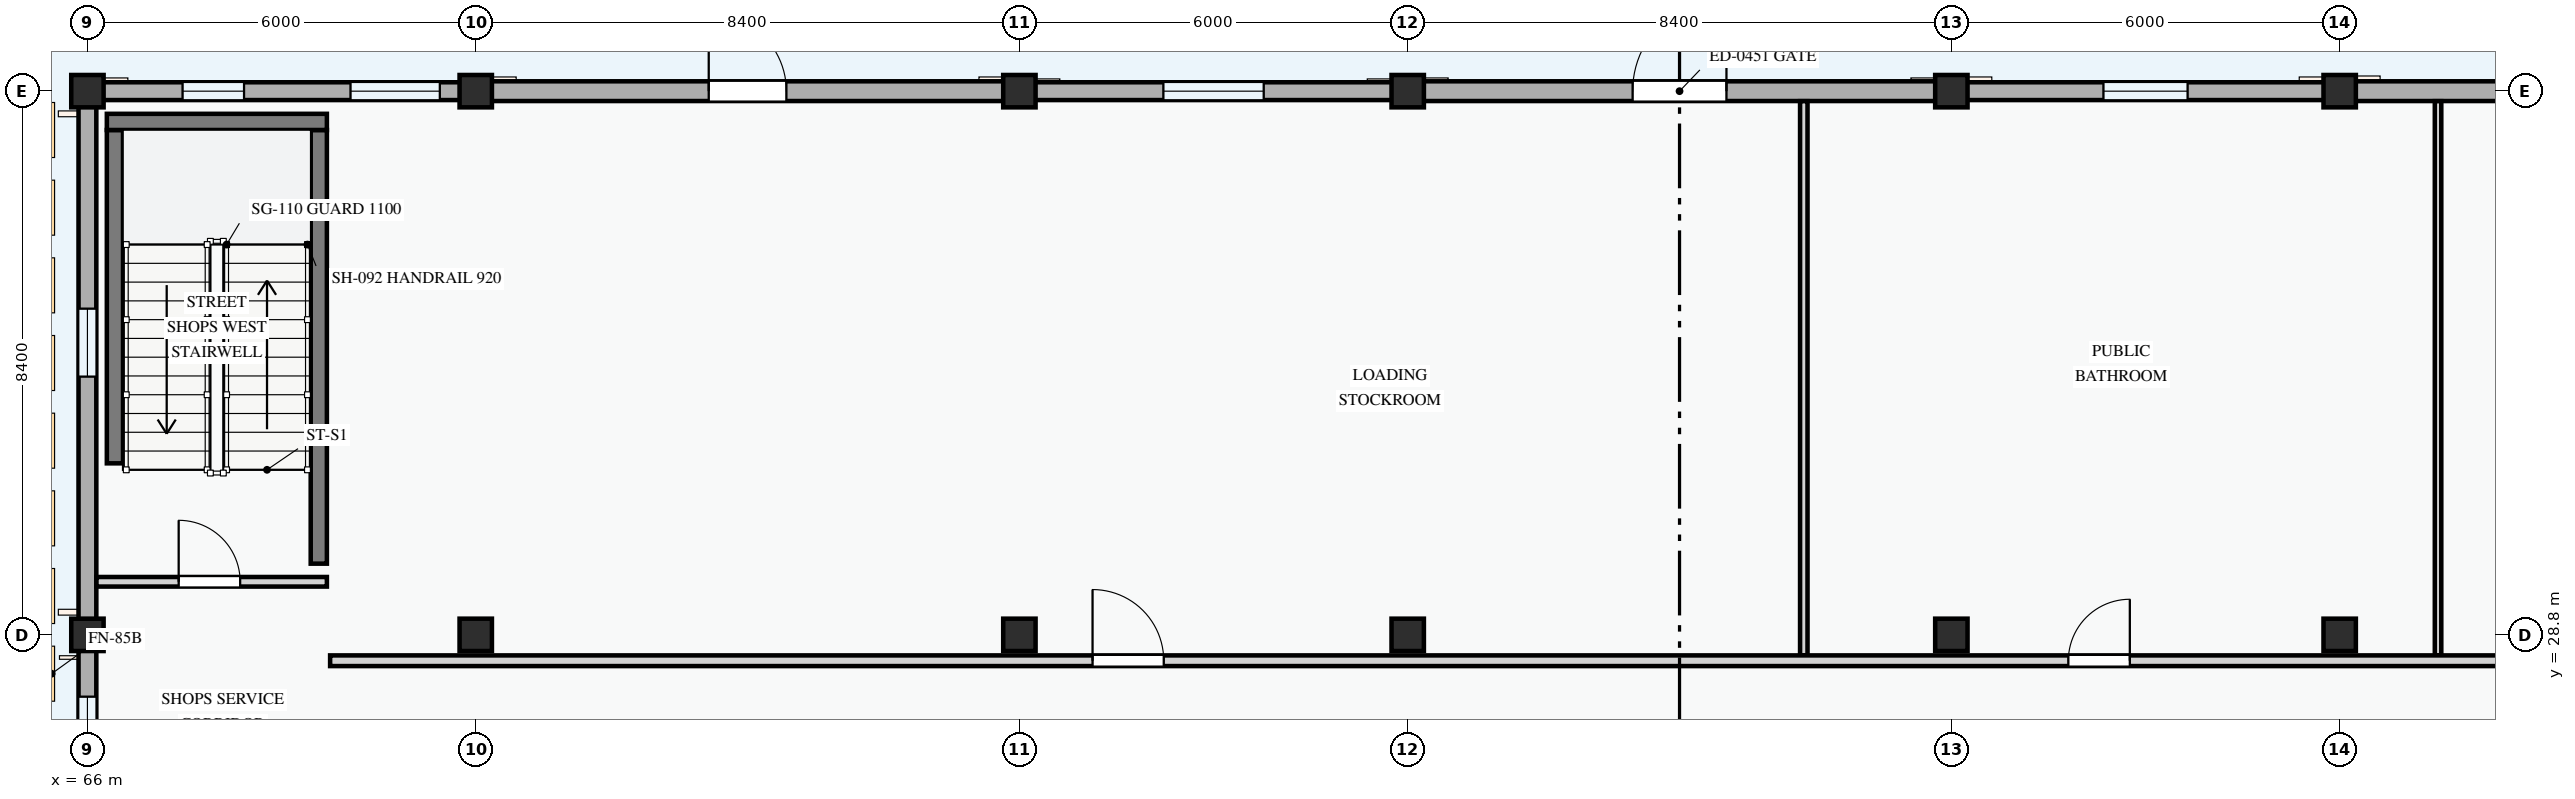
"""IFC4 building model, lengths in metres.
Left out: names, types, materials, properties, quantities, classifications, styles, units other than length and angle.
Written with IfcOpenShell. Run it as: python <this file> out.ifc"""

import sys

from ifc_helpers import new_model, si_unit, direction, frame, frame_2d, origin, origin_2d, place, context, subcontext, project, spatial, rectangle, circle, extrude, element, fill, save


model = new_model("IFC4")
c1 = context("Model", 3, precision=1e-05, world=origin(), true_north=direction((0.0, 1.0)))
c2 = subcontext(c1, "Body", "Model", "MODEL_VIEW")
j1 = project(units=[si_unit("LENGTHUNIT", "METRE"), si_unit("PLANEANGLEUNIT", "RADIAN")], contexts=[c1])
p1 = place(None, origin())
s1 = spatial("IfcSite", under=j1, at=p1, CompositionType="ELEMENT")
p2 = place(p1, origin())
s2 = spatial("IfcBuilding", under=s1, at=p2, CompositionType="ELEMENT")
p3 = place(p2, origin())
s3 = spatial("IfcBuildingStorey", under=s2, at=p3, CompositionType="ELEMENT", Elevation=0.0)
for number, where, z_axis, x_axis in (
    (1, (66.0, 28.8, 0.0), (0.0, 0.0, 1.0), (1.0, 0.0, 0.0)),
    (2, (66.0, 37.2, 0.0), (0.0, 0.0, 1.0), (1.0, 0.0, 0.0)),
):
    element("IfcColumn", number, at=place(p3, frame(where, z_axis=z_axis, x_axis=x_axis)), inside=s3, PredefinedType="COLUMN", context=c2, shape_type="SweptSolid", body=[
        extrude(rectangle(XDim=0.5, YDim=0.5, at=origin_2d()), origin(), (0.0, 0.0, 1.0), 4.5),
    ])
p4 = place(p3, frame((72.0, 28.8, 0.0), z_axis=(0.0, 0.0, 1.0), x_axis=(1.0, 0.0, 0.0)))
e3 = element("IfcColumn", 3, at=p4, inside=s3, PredefinedType="COLUMN", context=c2, shape_type="SweptSolid", body=[
    extrude(circle(Radius=0.25, at=origin_2d()), origin(), (0.0, 0.0, 1.0), 4.5),
])
p5 = place(p3, frame((72.0, 37.2, 0.0), z_axis=(0.0, 0.0, 1.0), x_axis=(1.0, 0.0, 0.0)))
e4 = element("IfcColumn", 4, at=p5, inside=s3, PredefinedType="COLUMN", context=c2, shape_type="SweptSolid", body=[
    extrude(rectangle(XDim=0.5, YDim=0.5, at=origin_2d()), origin(), (0.0, 0.0, 1.0), 4.5),
])
p6 = place(p3, frame((80.4, 28.8, 0.0), z_axis=(0.0, 0.0, 1.0), x_axis=(1.0, 0.0, 0.0)))
e5 = element("IfcColumn", 5, at=p6, inside=s3, PredefinedType="COLUMN", context=c2, shape_type="SweptSolid", body=[
    extrude(circle(Radius=0.25, at=origin_2d()), origin(), (0.0, 0.0, 1.0), 4.5),
])
p7 = place(p3, frame((80.4, 37.2, 0.0), z_axis=(0.0, 0.0, 1.0), x_axis=(1.0, 0.0, 0.0)))
e6 = element("IfcColumn", 6, at=p7, inside=s3, PredefinedType="COLUMN", context=c2, shape_type="SweptSolid", body=[
    extrude(rectangle(XDim=0.5, YDim=0.5, at=origin_2d()), origin(), (0.0, 0.0, 1.0), 4.5),
])
p8 = place(p3, frame((86.4, 28.8, 0.0), z_axis=(0.0, 0.0, 1.0), x_axis=(1.0, 0.0, 0.0)))
e7 = element("IfcColumn", 7, at=p8, inside=s3, PredefinedType="COLUMN", context=c2, shape_type="SweptSolid", body=[
    extrude(circle(Radius=0.25, at=origin_2d()), origin(), (0.0, 0.0, 1.0), 4.5),
])
p9 = place(p3, frame((86.4, 37.2, 0.0), z_axis=(0.0, 0.0, 1.0), x_axis=(1.0, 0.0, 0.0)))
e8 = element("IfcColumn", 8, at=p9, inside=s3, PredefinedType="COLUMN", context=c2, shape_type="SweptSolid", body=[
    extrude(rectangle(XDim=0.5, YDim=0.5, at=origin_2d()), origin(), (0.0, 0.0, 1.0), 4.5),
])
p10 = place(p3, frame((94.8, 28.8, 0.0), z_axis=(0.0, 0.0, 1.0), x_axis=(1.0, 0.0, 0.0)))
e9 = element("IfcColumn", 9, at=p10, inside=s3, PredefinedType="COLUMN", context=c2, shape_type="SweptSolid", body=[
    extrude(circle(Radius=0.25, at=origin_2d()), origin(), (0.0, 0.0, 1.0), 4.5),
])
p11 = place(p3, frame((94.8, 37.2, 0.0), z_axis=(0.0, 0.0, 1.0), x_axis=(1.0, 0.0, 0.0)))
e10 = element("IfcColumn", 10, at=p11, inside=s3, PredefinedType="COLUMN", context=c2, shape_type="SweptSolid", body=[
    extrude(rectangle(XDim=0.5, YDim=0.5, at=origin_2d()), origin(), (0.0, 0.0, 1.0), 4.5),
])
p12 = place(p3, frame((100.8, 28.8, 0.0), z_axis=(0.0, 0.0, 1.0), x_axis=(1.0, 0.0, 0.0)))
e11 = element("IfcColumn", 11, at=p12, inside=s3, PredefinedType="COLUMN", context=c2, shape_type="SweptSolid", body=[
    extrude(circle(Radius=0.25, at=origin_2d()), origin(), (0.0, 0.0, 1.0), 4.5),
])
p13 = place(p3, frame((100.8, 37.2, 0.0), z_axis=(0.0, 0.0, 1.0), x_axis=(1.0, 0.0, 0.0)))
e12 = element("IfcColumn", 12, at=p13, inside=s3, PredefinedType="COLUMN", context=c2, shape_type="SweptSolid", body=[
    extrude(rectangle(XDim=0.5, YDim=0.5, at=origin_2d()), origin(), (0.0, 0.0, 1.0), 4.5),
])
p14 = place(p3, frame((109.2, 37.2, 0.0), z_axis=(0.0, 0.0, 1.0), x_axis=(-1.0, 0.0, 0.0)))
e13 = element("IfcWall", 13, at=p14, inside=s3, PredefinedType="STANDARD", context=c2, shape_type="SweptSolid", body=[
    extrude(rectangle(XDim=8.4, YDim=0.305, at=frame_2d((4.2, 0.0))), origin(), (0.0, 0.0, 1.0), 3.485),
])
p15 = place(p14, frame((3.6, 0.0, 0.0)))
e14 = element("IfcOpeningElement", 14, at=p15, cuts=e13, PredefinedType="OPENING", context=c2, shape_type="SweptSolid", body=[
    extrude(rectangle(XDim=1.2, YDim=2.2, at=frame_2d((0.6, 1.1))), frame((0.0, 0.163, 0.0), z_axis=(0.0, -1.0, 0.0), x_axis=(1.0, 0.0, 0.0)), (0.0, 0.0, 1.0), 0.325),
])
p16 = place(p3, frame((100.8, 37.2, 0.0), z_axis=(0.0, 0.0, 1.0), x_axis=(-1.0, 0.0, 0.0)))
e15 = element("IfcWall", 15, at=p16, inside=s3, PredefinedType="STANDARD", context=c2, shape_type="SweptSolid", body=[
    extrude(rectangle(XDim=6.0, YDim=0.275, at=frame_2d((3.0, 0.0))), origin(), (0.0, 0.0, 1.0), 3.585),
])
p17 = place(p16, frame((2.35, 0.0, 0.8)))
e16 = element("IfcOpeningElement", 16, at=p17, cuts=e15, PredefinedType="OPENING", context=c2, shape_type="SweptSolid", body=[
    extrude(rectangle(XDim=1.3, YDim=1.4, at=frame_2d((0.65, 0.7))), frame((0.0, 0.147, 0.0), z_axis=(0.0, -1.0, 0.0), x_axis=(1.0, 0.0, 0.0)), (0.0, 0.0, 1.0), 0.295),
])
p18 = place(p3, frame((94.8, 37.2, 0.0), z_axis=(0.0, 0.0, 1.0), x_axis=(-1.0, 0.0, 0.0)))
e17 = element("IfcWall", 17, at=p18, inside=s3, PredefinedType="STANDARD", context=c2, shape_type="SweptSolid", body=[
    extrude(rectangle(XDim=8.4, YDim=0.305, at=frame_2d((4.2, 0.0))), origin(), (0.0, 0.0, 1.0), 3.485),
])
p19 = place(p18, frame((3.475, 0.0, 0.0)))
e18 = element("IfcOpeningElement", 18, at=p19, cuts=e17, PredefinedType="OPENING", context=c2, shape_type="SweptSolid", body=[
    extrude(rectangle(XDim=1.45, YDim=2.1, at=frame_2d((0.725, 1.05))), frame((0.0, 0.163, 0.0), z_axis=(0.0, -1.0, 0.0), x_axis=(1.0, 0.0, 0.0)), (0.0, 0.0, 1.0), 0.325),
])
p20 = place(p3, frame((86.4, 37.2, 0.0), z_axis=(0.0, 0.0, 1.0), x_axis=(-1.0, 0.0, 0.0)))
e19 = element("IfcWall", 19, at=p20, inside=s3, PredefinedType="STANDARD", context=c2, shape_type="SweptSolid", body=[
    extrude(rectangle(XDim=6.0, YDim=0.275, at=frame_2d((3.0, 0.0))), origin(), (0.0, 0.0, 1.0), 3.585),
])
p21 = place(p20, frame((2.225, 0.0, 0.8)))
e20 = element("IfcOpeningElement", 20, at=p21, cuts=e19, PredefinedType="OPENING", context=c2, shape_type="SweptSolid", body=[
    extrude(rectangle(XDim=1.55, YDim=1.4, at=frame_2d((0.775, 0.7))), frame((0.0, 0.147, 0.0), z_axis=(0.0, -1.0, 0.0), x_axis=(1.0, 0.0, 0.0)), (0.0, 0.0, 1.0), 0.295),
])
p22 = place(p3, frame((80.4, 37.2, 0.0), z_axis=(0.0, 0.0, 1.0), x_axis=(-1.0, 0.0, 0.0)))
e21 = element("IfcWall", 21, at=p22, inside=s3, PredefinedType="STANDARD", context=c2, shape_type="SweptSolid", body=[
    extrude(rectangle(XDim=8.4, YDim=0.305, at=frame_2d((4.2, 0.0))), origin(), (0.0, 0.0, 1.0), 3.485),
])
p23 = place(p22, frame((3.6, 0.0, 0.0)))
e22 = element("IfcOpeningElement", 22, at=p23, cuts=e21, PredefinedType="OPENING", context=c2, shape_type="SweptSolid", body=[
    extrude(rectangle(XDim=1.2, YDim=2.2, at=frame_2d((0.6, 1.1))), frame((0.0, 0.163, 0.0), z_axis=(0.0, -1.0, 0.0), x_axis=(1.0, 0.0, 0.0)), (0.0, 0.0, 1.0), 0.325),
])
p24 = place(p3, frame((72.0, 37.2, 0.0), z_axis=(0.0, 0.0, 1.0), x_axis=(-1.0, 0.0, 0.0)))
e23 = element("IfcWall", 23, at=p24, inside=s3, PredefinedType="STANDARD", context=c2, shape_type="SweptSolid", body=[
    extrude(rectangle(XDim=6.0, YDim=0.275, at=frame_2d((3.0, 0.0))), origin(), (0.0, 0.0, 1.0), 3.585),
])
p25 = place(p24, frame((0.555, 0.0, 0.8)))
e24 = element("IfcOpeningElement", 24, at=p25, cuts=e23, PredefinedType="OPENING", context=c2, shape_type="SweptSolid", body=[
    extrude(rectangle(XDim=1.38, YDim=1.48, at=frame_2d((0.69, 0.74))), frame((0.0, 0.147, 0.0), z_axis=(0.0, -1.0, 0.0), x_axis=(1.0, 0.0, 0.0)), (0.0, 0.0, 1.0), 0.295),
])
p26 = place(p24, frame((3.58, 0.0, 0.8)))
e25 = element("IfcOpeningElement", 25, at=p26, cuts=e23, PredefinedType="OPENING", context=c2, shape_type="SweptSolid", body=[
    extrude(rectangle(XDim=0.95, YDim=1.15, at=frame_2d((0.475, 0.575))), frame((0.0, 0.147, 0.0), z_axis=(0.0, -1.0, 0.0), x_axis=(1.0, 0.0, 0.0)), (0.0, 0.0, 1.0), 0.295),
])
p27 = place(p3, frame((66.0, 37.2, 0.0), z_axis=(0.0, 0.0, 1.0), x_axis=(0.0, -1.0, 0.0)))
e26 = element("IfcWall", 26, at=p27, inside=s3, PredefinedType="STANDARD", context=c2, shape_type="SweptSolid", body=[
    extrude(rectangle(XDim=8.4, YDim=0.275, at=frame_2d((4.2, 0.0))), origin(), (0.0, 0.0, 1.0), 3.485),
])
p28 = place(p27, frame((3.36, 0.0, 0.8)))
e27 = element("IfcOpeningElement", 27, at=p28, cuts=e26, PredefinedType="OPENING", context=c2, shape_type="SweptSolid", body=[
    extrude(rectangle(XDim=1.05, YDim=1.2, at=frame_2d((0.525, 0.6))), frame((0.0, 0.147, 0.0), z_axis=(0.0, -1.0, 0.0), x_axis=(1.0, 0.0, 0.0)), (0.0, 0.0, 1.0), 0.295),
])
p29 = place(p3, frame((66.0, 28.8, 0.0), z_axis=(0.0, 0.0, 1.0), x_axis=(0.0, -1.0, 0.0)))
e28 = element("IfcWall", 28, at=p29, inside=s3, PredefinedType="STANDARD", context=c2, shape_type="SweptSolid", body=[
    extrude(rectangle(XDim=6.0, YDim=0.275, at=frame_2d((3.0, 0.0))), origin(), (0.0, 0.0, 1.0), 3.585),
])
p30 = place(p29, frame((0.955, 0.0, 0.8)))
e29 = element("IfcOpeningElement", 29, at=p30, cuts=e28, PredefinedType="OPENING", context=c2, shape_type="SweptSolid", body=[
    extrude(rectangle(XDim=0.9, YDim=1.2, at=frame_2d((0.45, 0.6))), frame((0.0, 0.147, 0.0), z_axis=(0.0, -1.0, 0.0), x_axis=(1.0, 0.0, 0.0)), (0.0, 0.0, 1.0), 0.295),
])
p31 = place(p29, frame((3.44, 0.0, 0.8)))
e30 = element("IfcOpeningElement", 30, at=p31, cuts=e28, PredefinedType="OPENING", context=c2, shape_type="SweptSolid", body=[
    extrude(rectangle(XDim=1.55, YDim=1.4, at=frame_2d((0.775, 0.7))), frame((0.0, 0.147, 0.0), z_axis=(0.0, -1.0, 0.0), x_axis=(1.0, 0.0, 0.0)), (0.0, 0.0, 1.0), 0.295),
])
p32 = place(p3, frame((69.575, 29.9, 0.0), z_axis=(0.0, 0.0, 1.0), x_axis=(0.0, 1.0, 0.0)))
e31 = element("IfcWall", 31, at=p32, inside=s3, PredefinedType="SHEAR", context=c2, shape_type="SweptSolid", body=[
    extrude(rectangle(XDim=6.7, YDim=0.25, at=frame_2d((3.35, 0.0))), origin(), (0.0, 0.0, 1.0), 4.2),
])
p33 = place(p3, frame((66.425, 31.45, 0.0), z_axis=(0.0, 0.0, 1.0), x_axis=(0.0, 1.0, 0.0)))
e32 = element("IfcWall", 32, at=p33, inside=s3, PredefinedType="SHEAR", context=c2, shape_type="SweptSolid", body=[
    extrude(rectangle(XDim=5.15, YDim=0.25, at=frame_2d((2.575, 0.0))), origin(), (0.0, 0.0, 1.0), 4.2),
])
p34 = place(p3, frame((69.7, 36.725, 0.0), z_axis=(0.0, 0.0, 1.0), x_axis=(-1.0, 0.0, 0.0)))
e33 = element("IfcWall", 33, at=p34, inside=s3, PredefinedType="SHEAR", context=c2, shape_type="SweptSolid", body=[
    extrude(rectangle(XDim=3.4, YDim=0.25, at=frame_2d((1.7, 0.0))), origin(), (0.0, 0.0, 1.0), 4.2),
])
p35 = place(p3, frame((92.52, 28.485, 0.0), z_axis=(0.0, 0.0, 1.0), x_axis=(0.0, 1.0, 0.0)))
e34 = element("IfcWall", 34, at=p35, inside=s3, PredefinedType="PARTITIONING", context=c2, shape_type="SweptSolid", body=[
    extrude(rectangle(XDim=8.561, YDim=0.115, at=frame_2d((4.28, 0.0))), origin(), (0.0, 0.0, 1.0), 4.2),
])
p36 = place(p3, frame((102.32, 28.485, 0.0), z_axis=(0.0, 0.0, 1.0), x_axis=(0.0, 1.0, 0.0)))
e35 = element("IfcWall", 35, at=p36, inside=s3, PredefinedType="PARTITIONING", context=c2, shape_type="SweptSolid", body=[
    extrude(rectangle(XDim=8.561, YDim=0.1, at=frame_2d((4.28, 0.0))), origin(), (0.0, 0.0, 1.0), 4.2),
])
p37 = place(p3, frame((66.139, 29.62, 0.0), z_axis=(0.0, 0.0, 1.0), x_axis=(1.0, 0.0, 0.0)))
e36 = element("IfcWall", 36, at=p37, inside=s3, PredefinedType="PARTITIONING", context=c2, shape_type="SweptSolid", body=[
    extrude(rectangle(XDim=3.561, YDim=0.148, at=frame_2d((1.78, 0.0))), origin(), (0.0, 0.0, 1.0), 4.2),
])
p38 = place(p37, frame((1.271, 0.0, 0.0)))
e37 = element("IfcOpeningElement", 37, at=p38, cuts=e36, PredefinedType="OPENING", context=c2, shape_type="SweptSolid", body=[
    extrude(rectangle(XDim=0.95, YDim=2.1, at=frame_2d((0.475, 1.05))), frame((0.0, 0.084, 0.0), z_axis=(0.0, -1.0, 0.0), x_axis=(1.0, 0.0, 0.0)), (0.0, 0.0, 1.0), 0.168),
])
p39 = place(p3, frame((69.75, 28.4, 0.0), z_axis=(0.0, 0.0, 1.0), x_axis=(1.0, 0.0, 0.0)))
e38 = element("IfcWall", 38, at=p39, inside=s3, PredefinedType="PARTITIONING", context=c2, shape_type="SweptSolid", body=[
    extrude(rectangle(XDim=41.75, YDim=0.165, at=frame_2d((20.875, 0.0))), origin(), (0.0, 0.0, 1.0), 3.485),
])
p40 = place(p39, frame((11.781, 0.0, 0.0)))
e39 = element("IfcOpeningElement", 39, at=p40, cuts=e38, PredefinedType="OPENING", context=c2, shape_type="SweptSolid", body=[
    extrude(rectangle(XDim=1.1, YDim=2.15, at=frame_2d((0.55, 1.075))), frame((0.0, 0.093, 0.0), z_axis=(0.0, -1.0, 0.0), x_axis=(1.0, 0.0, 0.0)), (0.0, 0.0, 1.0), 0.185),
])
p41 = place(p39, frame((26.858, 0.0, 0.0)))
e40 = element("IfcOpeningElement", 40, at=p41, cuts=e38, PredefinedType="OPENING", context=c2, shape_type="SweptSolid", body=[
    extrude(rectangle(XDim=0.95, YDim=2.1, at=frame_2d((0.475, 1.05))), frame((0.0, 0.093, 0.0), z_axis=(0.0, -1.0, 0.0), x_axis=(1.0, 0.0, 0.0)), (0.0, 0.0, 1.0), 0.185),
])
p42 = place(p39, frame((35.737, 0.0, 0.0)))
e41 = element("IfcOpeningElement", 41, at=p42, cuts=e38, PredefinedType="OPENING", context=c2, shape_type="SweptSolid", body=[
    extrude(rectangle(XDim=0.95, YDim=2.1, at=frame_2d((0.475, 1.05))), frame((0.0, 0.093, 0.0), z_axis=(0.0, -1.0, 0.0), x_axis=(1.0, 0.0, 0.0)), (0.0, 0.0, 1.0), 0.185),
])
p43 = place(p17, origin())
e42 = element("IfcWindow", 42, at=p43, inside=s3, PartitioningType="SINGLE_PANEL", PredefinedType="WINDOW", context=c2, shape_type="SweptSolid", body=[
    extrude(rectangle(XDim=1.3, YDim=1.4, at=frame_2d((0.65, 0.7))), frame((0.0, 0.03, 0.0), z_axis=(0.0, -1.0, 0.0), x_axis=(1.0, 0.0, 0.0)), (0.0, 0.0, 1.0), 0.06),
])
fill(e16, e42)
p44 = place(p19, frame((1.45, 0.0, 0.0), z_axis=(0.0, 0.0, 1.0), x_axis=(-1.0, 0.0, 0.0)))
e43 = element("IfcDoor", 43, at=p44, inside=s3, OperationType="SINGLE_SWING_RIGHT", PredefinedType="GATE", context=c2, shape_type="SweptSolid", body=[
    extrude(rectangle(XDim=1.45, YDim=2.1, at=frame_2d((0.725, 1.05))), frame((0.0, 0.025, 0.0), z_axis=(0.0, -1.0, 0.0), x_axis=(1.0, 0.0, 0.0)), (0.0, 0.0, 1.0), 0.05),
])
fill(e18, e43)
p45 = place(p21, origin())
e44 = element("IfcWindow", 44, at=p45, inside=s3, PartitioningType="SINGLE_PANEL", PredefinedType="WINDOW", context=c2, shape_type="SweptSolid", body=[
    extrude(rectangle(XDim=1.55, YDim=1.4, at=frame_2d((0.775, 0.7))), frame((0.0, 0.03, 0.0), z_axis=(0.0, -1.0, 0.0), x_axis=(1.0, 0.0, 0.0)), (0.0, 0.0, 1.0), 0.06),
])
fill(e20, e44)
p46 = place(p23, frame((1.2, 0.0, 0.0), z_axis=(0.0, 0.0, 1.0), x_axis=(-1.0, 0.0, 0.0)))
e45 = element("IfcDoor", 45, at=p46, inside=s3, OperationType="SINGLE_SWING_LEFT", PredefinedType="DOOR", context=c2, shape_type="SweptSolid", body=[
    extrude(rectangle(XDim=1.2, YDim=2.2, at=frame_2d((0.6, 1.1))), frame((0.0, 0.025, 0.0), z_axis=(0.0, -1.0, 0.0), x_axis=(1.0, 0.0, 0.0)), (0.0, 0.0, 1.0), 0.05),
])
fill(e22, e45)
p47 = place(p25, origin())
e46 = element("IfcWindow", 46, at=p47, inside=s3, PartitioningType="SINGLE_PANEL", PredefinedType="WINDOW", context=c2, shape_type="SweptSolid", body=[
    extrude(rectangle(XDim=1.38, YDim=1.48, at=frame_2d((0.69, 0.74))), frame((0.0, 0.03, 0.0), z_axis=(0.0, -1.0, 0.0), x_axis=(1.0, 0.0, 0.0)), (0.0, 0.0, 1.0), 0.06),
])
fill(e24, e46)
p48 = place(p26, origin())
e47 = element("IfcWindow", 47, at=p48, inside=s3, PartitioningType="SINGLE_PANEL", PredefinedType="WINDOW", context=c2, shape_type="SweptSolid", body=[
    extrude(rectangle(XDim=0.95, YDim=1.15, at=frame_2d((0.475, 0.575))), frame((0.0, 0.03, 0.0), z_axis=(0.0, -1.0, 0.0), x_axis=(1.0, 0.0, 0.0)), (0.0, 0.0, 1.0), 0.06),
])
fill(e25, e47)
p49 = place(p28, origin())
e48 = element("IfcWindow", 48, at=p49, inside=s3, PartitioningType="SINGLE_PANEL", PredefinedType="WINDOW", context=c2, shape_type="SweptSolid", body=[
    extrude(rectangle(XDim=1.05, YDim=1.2, at=frame_2d((0.525, 0.6))), frame((0.0, 0.03, 0.0), z_axis=(0.0, -1.0, 0.0), x_axis=(1.0, 0.0, 0.0)), (0.0, 0.0, 1.0), 0.06),
])
fill(e27, e48)
p50 = place(p30, origin())
e49 = element("IfcWindow", 49, at=p50, inside=s3, PartitioningType="SINGLE_PANEL", PredefinedType="WINDOW", context=c2, shape_type="SweptSolid", body=[
    extrude(rectangle(XDim=0.9, YDim=1.2, at=frame_2d((0.45, 0.6))), frame((0.0, 0.03, 0.0), z_axis=(0.0, -1.0, 0.0), x_axis=(1.0, 0.0, 0.0)), (0.0, 0.0, 1.0), 0.06),
])
fill(e29, e49)
p51 = place(p38, origin())
e50 = element("IfcDoor", 50, at=p51, inside=s3, OperationType="SINGLE_SWING_LEFT", PredefinedType="DOOR", context=c2, shape_type="SweptSolid", body=[
    extrude(rectangle(XDim=0.95, YDim=2.1, at=frame_2d((0.475, 1.05))), frame((0.0, 0.025, 0.0), z_axis=(0.0, -1.0, 0.0), x_axis=(1.0, 0.0, 0.0)), (0.0, 0.0, 1.0), 0.05),
])
fill(e37, e50)
p52 = place(p40, origin())
e51 = element("IfcDoor", 51, at=p52, inside=s3, OperationType="SINGLE_SWING_LEFT", PredefinedType="DOOR", context=c2, shape_type="SweptSolid", body=[
    extrude(rectangle(XDim=1.1, YDim=2.15, at=frame_2d((0.55, 1.075))), frame((0.0, 0.025, 0.0), z_axis=(0.0, -1.0, 0.0), x_axis=(1.0, 0.0, 0.0)), (0.0, 0.0, 1.0), 0.05),
])
fill(e39, e51)
p53 = place(p41, origin())
e52 = element("IfcDoor", 52, at=p53, inside=s3, OperationType="SINGLE_SWING_RIGHT", PredefinedType="DOOR", context=c2, shape_type="SweptSolid", body=[
    extrude(rectangle(XDim=0.95, YDim=2.1, at=frame_2d((0.475, 1.05))), frame((0.0, 0.025, 0.0), z_axis=(0.0, -1.0, 0.0), x_axis=(1.0, 0.0, 0.0)), (0.0, 0.0, 1.0), 0.05),
])
fill(e40, e52)
save(model, sys.argv[1])
